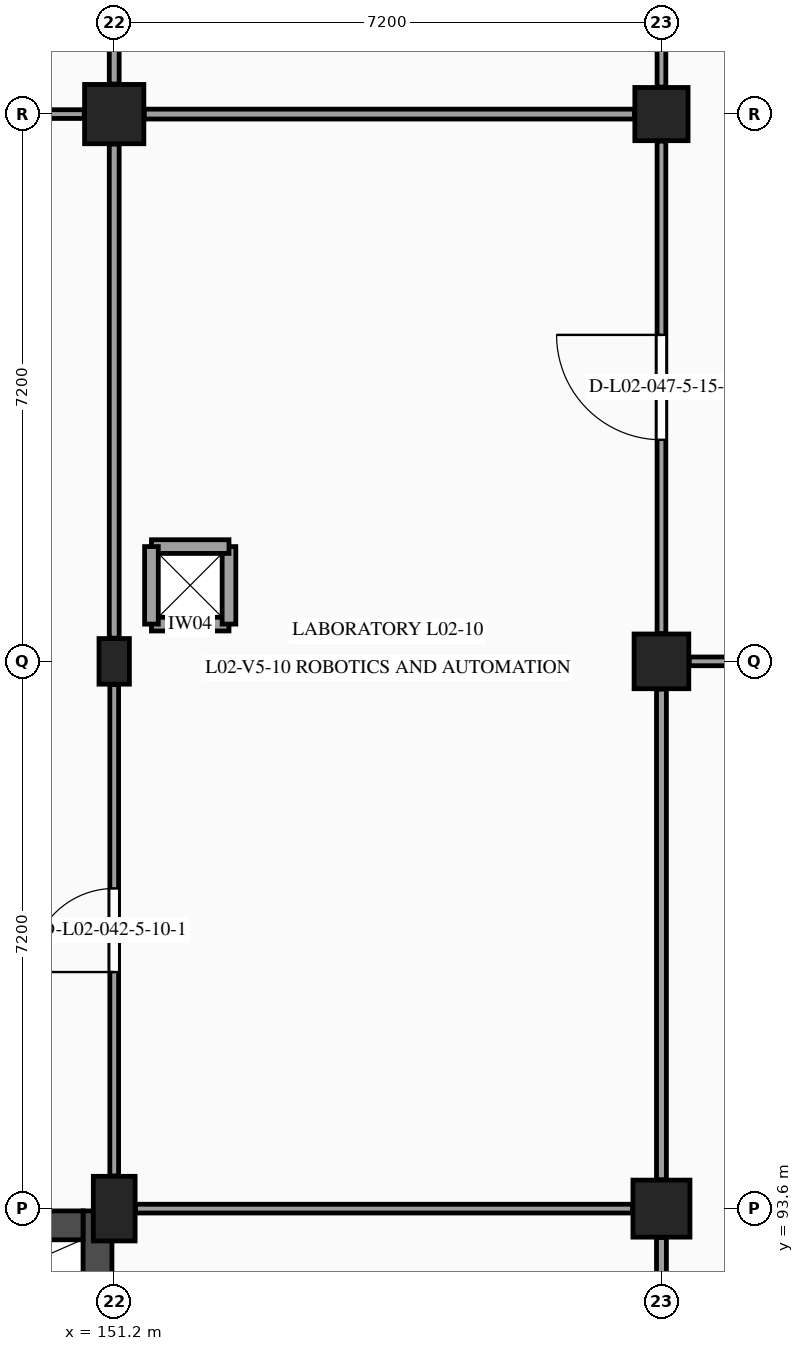
"""IFC4 building model, lengths in metres.
Left out: names, types, materials, properties, quantities, classifications, styles, units other than length and angle.
Written with IfcOpenShell. Run it as: python <this file> out.ifc"""

import sys

from ifc_helpers import new_model, si_unit, direction, frame, frame_2d, origin, origin_2d, place, context, subcontext, project, spatial, rectangle, extrude, element, fill, save


model = new_model("IFC4")
c1 = context("Model", 3, precision=1e-05, world=origin(), true_north=direction((0.0, 1.0)))
c2 = subcontext(c1, "Body", "Model", "MODEL_VIEW")
j1 = project(units=[si_unit("LENGTHUNIT", "METRE"), si_unit("PLANEANGLEUNIT", "RADIAN")], contexts=[c1])
p1 = place(None, origin())
s1 = spatial("IfcSite", under=j1, at=p1, CompositionType="ELEMENT")
p2 = place(p1, origin())
s2 = spatial("IfcBuilding", under=s1, at=p2, CompositionType="ELEMENT")
p3 = place(p2, frame((0.0, 0.0, 9.9)))
s3 = spatial("IfcBuildingStorey", under=s2, at=p3, CompositionType="ELEMENT", Elevation=9.9)
p4 = place(p3, frame((151.2, 93.6, 0.0), z_axis=(0.0, 0.0, 1.0), x_axis=(1.0, 0.0, 0.0)))
e1 = element("IfcColumn", 1, at=p4, inside=s3, PredefinedType="COLUMN", context=c2, shape_type="SweptSolid", body=[
    extrude(rectangle(XDim=0.55, YDim=0.85, at=origin_2d()), origin(), (0.0, 0.0, 1.0), 4.5),
])
p5 = place(p3, frame((151.2, 100.8, 0.0), z_axis=(0.0, 0.0, 1.0), x_axis=(1.0, 0.0, 0.0)))
e2 = element("IfcColumn", 2, at=p5, inside=s3, PredefinedType="PILASTER", context=c2, shape_type="SweptSolid", body=[
    extrude(rectangle(XDim=0.4, YDim=0.6, at=origin_2d()), origin(), (0.0, 0.0, 1.0), 4.5),
])
p6 = place(p3, frame((151.2, 108.0, 0.0), z_axis=(0.0, 0.0, 1.0), x_axis=(1.0, 0.0, 0.0)))
e3 = element("IfcColumn", 3, at=p6, inside=s3, PredefinedType="COLUMN", context=c2, shape_type="SweptSolid", body=[
    extrude(rectangle(XDim=0.78, YDim=0.78, at=origin_2d()), origin(), (0.0, 0.0, 1.0), 4.5),
])
p7 = place(p3, frame((158.4, 93.6, 0.0), z_axis=(0.0, 0.0, 1.0), x_axis=(1.0, 0.0, 0.0)))
e4 = element("IfcColumn", 4, at=p7, inside=s3, PredefinedType="COLUMN", context=c2, shape_type="SweptSolid", body=[
    extrude(rectangle(XDim=0.75, YDim=0.75, at=origin_2d()), origin(), (0.0, 0.0, 1.0), 4.5),
])
p8 = place(p3, frame((158.4, 100.8, 0.0), z_axis=(0.0, 0.0, 1.0), x_axis=(1.0, 0.0, 0.0)))
e5 = element("IfcColumn", 5, at=p8, inside=s3, PredefinedType="COLUMN", context=c2, shape_type="SweptSolid", body=[
    extrude(rectangle(XDim=0.72, YDim=0.72, at=origin_2d()), origin(), (0.0, 0.0, 1.0), 4.5),
])
p9 = place(p3, frame((158.4, 108.0, 0.0), z_axis=(0.0, 0.0, 1.0), x_axis=(1.0, 0.0, 0.0)))
e6 = element("IfcColumn", 6, at=p9, inside=s3, PredefinedType="COLUMN", context=c2, shape_type="SweptSolid", body=[
    extrude(rectangle(XDim=0.7, YDim=0.7, at=origin_2d()), origin(), (0.0, 0.0, 1.0), 4.5),
])
p10 = place(p3, frame((150.98, 86.43, 0.0), z_axis=(0.0, 0.0, 1.0), x_axis=(0.0, 1.0, 0.0)))
e7 = element("IfcWall", 7, at=p10, inside=s3, PredefinedType="SHEAR", context=c2, shape_type="SweptSolid", body=[
    extrude(rectangle(XDim=7.14, YDim=0.38, at=frame_2d((3.57, 0.0))), origin(), (0.0, 0.0, 1.0), 4.225),
])
p11 = place(p3, frame((144.19, 93.38, 0.0), z_axis=(0.0, 0.0, 1.0), x_axis=(1.0, 0.0, 0.0)))
e8 = element("IfcWall", 8, at=p11, inside=s3, PredefinedType="SHEAR", context=c2, shape_type="SweptSolid", body=[
    extrude(rectangle(XDim=6.6, YDim=0.38, at=frame_2d((3.3, 0.0))), origin(), (0.0, 0.0, 1.0), 4.225),
])
for number, where, z_axis, x_axis in (
    (9, (151.69, 101.29, 0.0), (0.0, 0.0, 1.0), (1.0, 0.0, 0.0)),
    (10, (152.71, 101.29, 0.0), (0.0, 0.0, 1.0), (0.0, 1.0, 0.0)),
    (11, (152.71, 102.31, 0.0), (0.0, 0.0, 1.0), (-1.0, 0.0, 0.0)),
    (12, (151.69, 102.31, 0.0), (0.0, 0.0, 1.0), (0.0, -1.0, 0.0)),
):
    element("IfcWall", number, at=place(p3, frame(where, z_axis=z_axis, x_axis=x_axis)), inside=s3, PredefinedType="PARTITIONING", context=c2, shape_type="SweptSolid", body=[
        extrude(rectangle(XDim=1.02, YDim=0.18, at=frame_2d((0.51, 0.0))), origin(), (0.0, 0.0, 1.0), 4.225),
    ])
p12 = place(p3, frame((151.2, 94.03, 0.0), z_axis=(0.0, 0.0, 1.0), x_axis=(0.0, 1.0, 0.0)))
e13 = element("IfcWall", 13, at=p12, inside=s3, PredefinedType="PARTITIONING", context=c2, shape_type="SweptSolid", body=[
    extrude(rectangle(XDim=6.465, YDim=0.115, at=frame_2d((3.232, 0.0))), origin(), (0.0, 0.0, 1.0), 3.54),
])
p13 = place(p12, frame((2.683, 0.0, 0.0)))
e14 = element("IfcOpeningElement", 14, at=p13, cuts=e13, PredefinedType="OPENING", context=c2, shape_type="SweptSolid", body=[
    extrude(rectangle(XDim=1.1, YDim=2.15, at=frame_2d((0.55, 1.075))), frame((0.0, 0.067, 0.0), z_axis=(0.0, -1.0, 0.0), x_axis=(1.0, 0.0, 0.0)), (0.0, 0.0, 1.0), 0.135),
])
p14 = place(p3, frame((151.2, 101.105, 0.0), z_axis=(0.0, 0.0, 1.0), x_axis=(0.0, 1.0, 0.0)))
e15 = element("IfcWall", 15, at=p14, inside=s3, PredefinedType="PARTITIONING", context=c2, shape_type="SweptSolid", body=[
    extrude(rectangle(XDim=6.5, YDim=0.13, at=frame_2d((3.25, 0.0))), origin(), (0.0, 0.0, 1.0), 3.54),
])
p15 = place(p3, frame((144.355, 108.0, 0.0), z_axis=(0.0, 0.0, 1.0), x_axis=(1.0, 0.0, 0.0)))
e16 = element("IfcWall", 16, at=p15, inside=s3, PredefinedType="PARTITIONING", context=c2, shape_type="SweptSolid", body=[
    extrude(rectangle(XDim=6.45, YDim=0.115, at=frame_2d((3.225, 0.0))), origin(), (0.0, 0.0, 1.0), 3.485),
])
p16 = place(p3, frame((151.2, 108.395, 0.0), z_axis=(0.0, 0.0, 1.0), x_axis=(0.0, 1.0, 0.0)))
e17 = element("IfcWall", 17, at=p16, inside=s3, PredefinedType="PARTITIONING", context=c2, shape_type="SweptSolid", body=[
    extrude(rectangle(XDim=6.425, YDim=0.13, at=frame_2d((3.212, 0.0))), origin(), (0.0, 0.0, 1.0), 3.535),
])
p17 = place(p16, frame((2.738, 0.0, 0.0)))
e18 = element("IfcOpeningElement", 18, at=p17, cuts=e17, PredefinedType="OPENING", context=c2, shape_type="SweptSolid", body=[
    extrude(rectangle(XDim=0.95, YDim=2.15, at=frame_2d((0.475, 1.075))), frame((0.0, 0.075, 0.0), z_axis=(0.0, -1.0, 0.0), x_axis=(1.0, 0.0, 0.0)), (0.0, 0.0, 1.0), 0.15),
])
p18 = place(p3, frame((158.4, 86.795, 0.0), z_axis=(0.0, 0.0, 1.0), x_axis=(0.0, 1.0, 0.0)))
e19 = element("IfcWall", 19, at=p18, inside=s3, PredefinedType="PARTITIONING", context=c2, shape_type="SweptSolid", body=[
    extrude(rectangle(XDim=6.425, YDim=0.13, at=frame_2d((3.212, 0.0))), origin(), (0.0, 0.0, 1.0), 3.59),
])
p19 = place(p18, frame((2.433, 0.0, 0.0)))
e20 = element("IfcOpeningElement", 20, at=p19, cuts=e19, PredefinedType="OPENING", context=c2, shape_type="SweptSolid", body=[
    extrude(rectangle(XDim=1.56, YDim=2.25, at=frame_2d((0.78, 1.125))), frame((0.0, 0.075, 0.0), z_axis=(0.0, -1.0, 0.0), x_axis=(1.0, 0.0, 0.0)), (0.0, 0.0, 1.0), 0.15),
])
p20 = place(p3, frame((151.48, 93.6, 0.0), z_axis=(0.0, 0.0, 1.0), x_axis=(1.0, 0.0, 0.0)))
e21 = element("IfcWall", 21, at=p20, inside=s3, PredefinedType="PARTITIONING", context=c2, shape_type="SweptSolid", body=[
    extrude(rectangle(XDim=6.54, YDim=0.115, at=frame_2d((3.27, 0.0))), origin(), (0.0, 0.0, 1.0), 3.5),
])
p21 = place(p3, frame((158.4, 93.98, 0.0), z_axis=(0.0, 0.0, 1.0), x_axis=(0.0, 1.0, 0.0)))
e22 = element("IfcWall", 22, at=p21, inside=s3, PredefinedType="PARTITIONING", context=c2, shape_type="SweptSolid", body=[
    extrude(rectangle(XDim=6.455, YDim=0.13, at=frame_2d((3.228, 0.0))), origin(), (0.0, 0.0, 1.0), 3.54),
])
p22 = place(p3, frame((158.4, 101.165, 0.0), z_axis=(0.0, 0.0, 1.0), x_axis=(0.0, 1.0, 0.0)))
e23 = element("IfcWall", 23, at=p22, inside=s3, PredefinedType="PARTITIONING", context=c2, shape_type="SweptSolid", body=[
    extrude(rectangle(XDim=6.48, YDim=0.115, at=frame_2d((3.24, 0.0))), origin(), (0.0, 0.0, 1.0), 3.54),
])
p23 = place(p22, frame((2.55, 0.0, 0.0)))
e24 = element("IfcOpeningElement", 24, at=p23, cuts=e23, PredefinedType="OPENING", context=c2, shape_type="SweptSolid", body=[
    extrude(rectangle(XDim=1.38, YDim=2.22, at=frame_2d((0.69, 1.11))), frame((0.0, 0.067, 0.0), z_axis=(0.0, -1.0, 0.0), x_axis=(1.0, 0.0, 0.0)), (0.0, 0.0, 1.0), 0.135),
])
p24 = place(p3, frame((151.595, 108.0, 0.0), z_axis=(0.0, 0.0, 1.0), x_axis=(1.0, 0.0, 0.0)))
e25 = element("IfcWall", 25, at=p24, inside=s3, PredefinedType="PARTITIONING", context=c2, shape_type="SweptSolid", body=[
    extrude(rectangle(XDim=6.45, YDim=0.13, at=frame_2d((3.225, 0.0))), origin(), (0.0, 0.0, 1.0), 3.5),
])
p25 = place(p3, frame((158.4, 108.355, 0.0), z_axis=(0.0, 0.0, 1.0), x_axis=(0.0, 1.0, 0.0)))
e26 = element("IfcWall", 26, at=p25, inside=s3, PredefinedType="PARTITIONING", context=c2, shape_type="SweptSolid", body=[
    extrude(rectangle(XDim=6.415, YDim=0.115, at=frame_2d((3.208, 0.0))), origin(), (0.0, 0.0, 1.0), 3.535),
])
p26 = place(p3, frame((158.765, 100.8, 0.0), z_axis=(0.0, 0.0, 1.0), x_axis=(1.0, 0.0, 0.0)))
e27 = element("IfcWall", 27, at=p26, inside=s3, PredefinedType="PARTITIONING", context=c2, shape_type="SweptSolid", body=[
    extrude(rectangle(XDim=6.63, YDim=0.115, at=frame_2d((3.315, 0.0))), origin(), (0.0, 0.0, 1.0), 3.505),
])
p27 = place(p13, origin())
e28 = element("IfcDoor", 28, at=p27, inside=s3, OperationType="SINGLE_SWING_LEFT", PredefinedType="DOOR", context=c2, shape_type="SweptSolid", body=[
    extrude(rectangle(XDim=1.1, YDim=2.15, at=frame_2d((0.55, 1.075))), frame((0.0, 0.025, 0.0), z_axis=(0.0, -1.0, 0.0), x_axis=(1.0, 0.0, 0.0)), (0.0, 0.0, 1.0), 0.05),
])
fill(e14, e28)
p28 = place(p23, origin())
e29 = element("IfcDoor", 29, at=p28, inside=s3, OperationType="SINGLE_SWING_RIGHT", PredefinedType="DOOR", context=c2, shape_type="SweptSolid", body=[
    extrude(rectangle(XDim=1.38, YDim=2.22, at=frame_2d((0.69, 1.11))), frame((0.0, 0.025, 0.0), z_axis=(0.0, -1.0, 0.0), x_axis=(1.0, 0.0, 0.0)), (0.0, 0.0, 1.0), 0.05),
])
fill(e24, e29)
save(model, sys.argv[1])
